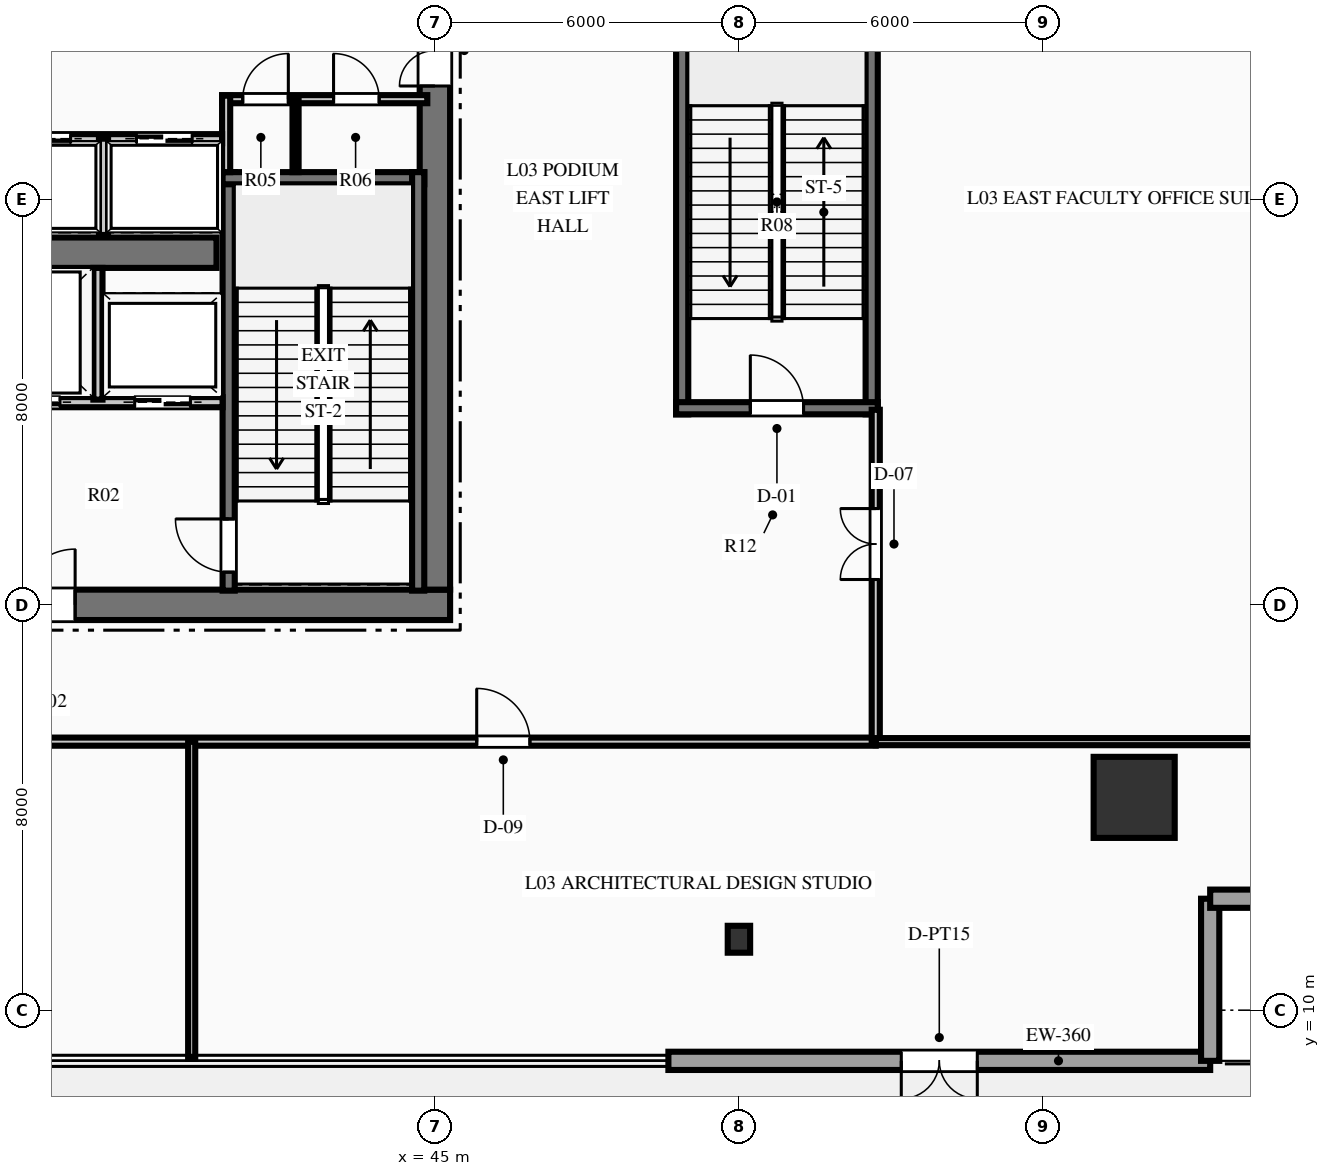
"""IFC4 building model, lengths in metres.
Left out: names, types, materials, properties, quantities, classifications, styles, units other than length and angle.
Written with IfcOpenShell. Run it as: python <this file> out.ifc"""

import sys

from ifc_helpers import new_model, si_unit, direction, frame, frame_2d, origin, origin_2d, place, context, subcontext, project, spatial, rectangle, hollow_rectangle, i_section, extrude, element, fill, save


model = new_model("IFC4")
c1 = context("Model", 3, precision=1e-05, world=origin(), true_north=direction((0.0, 1.0)))
c2 = subcontext(c1, "Body", "Model", "MODEL_VIEW")
j1 = project(units=[si_unit("LENGTHUNIT", "METRE"), si_unit("PLANEANGLEUNIT", "RADIAN")], contexts=[c1])
p1 = place(None, origin())
s1 = spatial("IfcSite", under=j1, at=p1, CompositionType="ELEMENT")
p2 = place(p1, origin())
s2 = spatial("IfcBuilding", under=s1, at=p2, CompositionType="ELEMENT")
p3 = place(p2, frame((0.0, 0.0, 16.8)))
s3 = spatial("IfcBuildingStorey", under=s2, at=p3, CompositionType="ELEMENT", Elevation=16.8)
p4 = place(p3, frame((26.7, 18.0, 0.0), z_axis=(0.0, 0.0, 1.0), x_axis=(1.0, 0.0, 0.0)))
e1 = element("IfcWall", 1, at=p4, inside=s3, PredefinedType="SHEAR", context=c2, shape_type="SweptSolid", body=[
    extrude(rectangle(XDim=18.6, YDim=0.6, at=frame_2d((9.3, 0.0))), origin(), (0.0, 0.0, 1.0), 5.4),
])
p5 = place(p4, frame((7.4, 0.0, 0.0)))
e2 = element("IfcOpeningElement", 2, at=p5, cuts=e1, PredefinedType="OPENING", context=c2, shape_type="SweptSolid", body=[
    extrude(rectangle(XDim=1.1, YDim=2.15, at=frame_2d((0.55, 1.075))), frame((0.0, 0.31, 0.0), z_axis=(0.0, -1.0, 0.0), x_axis=(1.0, 0.0, 0.0)), (0.0, 0.0, 1.0), 0.62),
])
p6 = place(p4, frame((10.1, 0.0, 0.0)))
e3 = element("IfcOpeningElement", 3, at=p6, cuts=e1, PredefinedType="OPENING", context=c2, shape_type="SweptSolid", body=[
    extrude(rectangle(XDim=1.1, YDim=2.15, at=frame_2d((0.55, 1.075))), frame((0.0, 0.31, 0.0), z_axis=(0.0, -1.0, 0.0), x_axis=(1.0, 0.0, 0.0)), (0.0, 0.0, 1.0), 0.62),
])
p7 = place(p3, frame((45.0, 18.3, 0.0), z_axis=(0.0, 0.0, 1.0), x_axis=(0.0, 1.0, 0.0)))
e4 = element("IfcWall", 4, at=p7, inside=s3, PredefinedType="SHEAR", context=c2, shape_type="SweptSolid", body=[
    extrude(rectangle(XDim=15.4, YDim=0.6, at=frame_2d((7.7, 0.0))), origin(), (0.0, 0.0, 1.0), 5.4),
])
p8 = place(p7, frame((9.94, 0.0, 0.0)))
e5 = element("IfcOpeningElement", 5, at=p8, cuts=e4, PredefinedType="OPENING", context=c2, shape_type="SweptSolid", body=[
    extrude(rectangle(XDim=1.4, YDim=2.2, at=frame_2d((0.7, 1.1))), frame((0.0, 0.31, 0.0), z_axis=(0.0, -1.0, 0.0), x_axis=(1.0, 0.0, 0.0)), (0.0, 0.0, 1.0), 0.62),
])
p9 = place(p3, frame((31.31, 24.95, 0.0), z_axis=(0.0, 0.0, 1.0), x_axis=(1.0, 0.0, 0.0)))
e6 = element("IfcWall", 6, at=p9, inside=s3, PredefinedType="SHEAR", context=c2, shape_type="SweptSolid", body=[
    extrude(rectangle(XDim=9.38, YDim=0.6, at=frame_2d((4.69, 0.0))), origin(), (0.0, 0.0, 1.0), 5.4),
])
p10 = place(p3, frame((40.93, 18.28, 0.0), z_axis=(0.0, 0.0, 1.0), x_axis=(0.0, 1.0, 0.0)))
e7 = element("IfcWall", 7, at=p10, inside=s3, PredefinedType="SHEAR", context=c2, shape_type="SweptSolid", body=[
    extrude(rectangle(XDim=8.26, YDim=0.24, at=frame_2d((4.13, 0.0))), origin(), (0.0, 0.0, 1.0), 5.4),
])
p11 = place(p10, frame((0.365, 0.0, 0.0)))
e8 = element("IfcOpeningElement", 8, at=p11, cuts=e7, PredefinedType="OPENING", context=c2, shape_type="SweptSolid", body=[
    extrude(rectangle(XDim=1.05, YDim=2.15, at=frame_2d((0.525, 1.075))), frame((0.0, 0.13, 0.0), z_axis=(0.0, -1.0, 0.0), x_axis=(1.0, 0.0, 0.0)), (0.0, 0.0, 1.0), 0.26),
])
p12 = place(p3, frame((40.81, 26.42, 0.0), z_axis=(0.0, 0.0, 1.0), x_axis=(1.0, 0.0, 0.0)))
e9 = element("IfcWall", 9, at=p12, inside=s3, PredefinedType="SHEAR", context=c2, shape_type="SweptSolid", body=[
    extrude(rectangle(XDim=3.98, YDim=0.24, at=frame_2d((1.99, 0.0))), origin(), (0.0, 0.0, 1.0), 5.4),
])
p13 = place(p3, frame((44.67, 18.28, 0.0), z_axis=(0.0, 0.0, 1.0), x_axis=(0.0, 1.0, 0.0)))
e10 = element("IfcWall", 10, at=p13, inside=s3, PredefinedType="SHEAR", context=c2, shape_type="SweptSolid", body=[
    extrude(rectangle(XDim=8.26, YDim=0.24, at=frame_2d((4.13, 0.0))), origin(), (0.0, 0.0, 1.0), 5.4),
])
for number, where, z_axis, x_axis in (
    (11, (49.88, 21.76, 0.0), (0.0, 0.0, 1.0), (0.0, 1.0, 0.0)),
    (12, (53.62, 21.76, 0.0), (0.0, 0.0, 1.0), (0.0, 1.0, 0.0)),
):
    element("IfcWall", number, at=place(p3, frame(where, z_axis=z_axis, x_axis=x_axis)), inside=s3, PredefinedType="SHEAR", context=c2, shape_type="SweptSolid", body=[
        extrude(rectangle(XDim=8.38, YDim=0.24, at=frame_2d((4.19, 0.0))), origin(), (0.0, 0.0, 1.0), 5.4),
    ])
p14 = place(p3, frame((49.76, 21.88, 0.0), z_axis=(0.0, 0.0, 1.0), x_axis=(1.0, 0.0, 0.0)))
e13 = element("IfcWall", 13, at=p14, inside=s3, PredefinedType="SHEAR", context=c2, shape_type="SweptSolid", body=[
    extrude(rectangle(XDim=3.98, YDim=0.24, at=frame_2d((1.99, 0.0))), origin(), (0.0, 0.0, 1.0), 5.4),
])
p15 = place(p14, frame((1.465, 0.0, 0.0)))
e14 = element("IfcOpeningElement", 14, at=p15, cuts=e13, PredefinedType="OPENING", context=c2, shape_type="SweptSolid", body=[
    extrude(rectangle(XDim=1.05, YDim=2.15, at=frame_2d((0.525, 1.075))), frame((0.0, 0.13, 0.0), z_axis=(0.0, -1.0, 0.0), x_axis=(1.0, 0.0, 0.0)), (0.0, 0.0, 1.0), 0.26),
])
p16 = place(p3, frame((58.8, 14.2, 0.0), z_axis=(0.0, 0.0, 1.0), x_axis=(1.0, 0.0, 0.0)))
e15 = element("IfcColumn", 15, at=p16, inside=s3, PredefinedType="COLUMN", context=c2, shape_type="SweptSolid", body=[
    extrude(hollow_rectangle(XDim=1.6, YDim=1.6, WallThickness=0.08, at=origin_2d()), origin(), (0.0, 0.0, 1.0), 5.4),
])
p17 = place(p3, frame((51.0, 11.4, 0.0), z_axis=(0.0, 0.0, 1.0), x_axis=(1.0, 0.0, 0.0)))
e16 = element("IfcColumn", 16, at=p17, inside=s3, PredefinedType="COLUMN", context=c2, shape_type="SweptSolid", body=[
    extrude(i_section(OverallWidth=0.442, OverallDepth=0.531, WebThickness=0.066, FlangeThickness=0.106, at=origin_2d()), origin(), (0.0, 0.0, 1.0), 5.4),
])
p18 = place(p3, frame((60.3, 9.0, 0.0), z_axis=(0.0, 0.0, 1.0), x_axis=(-1.0, 0.0, 0.0)))
e17 = element("IfcWall", 17, at=p18, inside=s3, PredefinedType="STANDARD", context=c2, shape_type="SweptSolid", body=[
    extrude(rectangle(XDim=10.692, YDim=0.36, at=frame_2d((5.346, 0.0))), origin(), (0.0, 0.0, 1.0), 4.98),
])
p19 = place(p18, frame((4.596, 0.0, 0.0)))
e18 = element("IfcOpeningElement", 18, at=p19, cuts=e17, PredefinedType="OPENING", context=c2, shape_type="SweptSolid", body=[
    extrude(rectangle(XDim=1.5, YDim=2.25, at=frame_2d((0.75, 1.125))), frame((0.0, 0.19, 0.0), z_axis=(0.0, -1.0, 0.0), x_axis=(1.0, 0.0, 0.0)), (0.0, 0.0, 1.0), 0.38),
])
for number, where, z_axis, x_axis in (
    (19, (60.3, 12.2, 0.0), (0.0, 0.0, 1.0), (0.0, -1.0, 0.0)),
    (20, (63.5, 12.2, 0.0), (0.0, 0.0, 1.0), (-1.0, 0.0, 0.0)),
):
    element("IfcWall", number, at=place(p3, frame(where, z_axis=z_axis, x_axis=x_axis)), inside=s3, PredefinedType="STANDARD", context=c2, shape_type="SweptSolid", body=[
        extrude(rectangle(XDim=3.2, YDim=0.36, at=frame_2d((1.6, 0.0))), origin(), (0.0, 0.0, 1.0), 4.98),
    ])
p20 = place(p3, frame((36.12, 22.0, 0.0), z_axis=(0.0, 0.0, 1.0), x_axis=(1.0, 0.0, 0.0)))
e21 = element("IfcWall", 21, at=p20, inside=s3, PredefinedType="PARTITIONING", context=c2, shape_type="SweptSolid", body=[
    extrude(rectangle(XDim=4.69, YDim=0.2, at=frame_2d((2.345, 0.0))), origin(), (0.0, 0.0, 1.0), 4.98),
])
p21 = place(p20, frame((2.955, 0.0, 0.0)))
e22 = element("IfcOpeningElement", 22, at=p21, cuts=e21, PredefinedType="OPENING", context=c2, shape_type="SweptSolid", body=[
    extrude(rectangle(XDim=1.1, YDim=2.15, at=frame_2d((0.55, 1.075))), frame((0.0, 0.11, 0.0), z_axis=(0.0, -1.0, 0.0), x_axis=(1.0, 0.0, 0.0)), (0.0, 0.0, 1.0), 0.22),
])
p22 = place(p20, frame((0.08, 0.0, 0.0)))
e23 = element("IfcOpeningElement", 23, at=p22, cuts=e21, PredefinedType="OPENING", context=c2, shape_type="SweptSolid", body=[
    extrude(rectangle(XDim=1.4, YDim=2.2, at=frame_2d((0.7, 1.1))), frame((0.0, 0.11, 0.0), z_axis=(0.0, -1.0, 0.0), x_axis=(1.0, 0.0, 0.0)), (0.0, 0.0, 1.0), 0.22),
])
p23 = place(p3, frame((38.35, 22.05, 0.0), z_axis=(0.0, 0.0, 1.0), x_axis=(0.0, 1.0, 0.0)))
e24 = element("IfcWall", 24, at=p23, inside=s3, PredefinedType="PARTITIONING", context=c2, shape_type="SweptSolid", body=[
    extrude(rectangle(XDim=2.6, YDim=0.18, at=frame_2d((1.3, 0.0))), origin(), (0.0, 0.0, 1.0), 4.98),
])
p24 = place(p3, frame((40.8, 27.98, 0.0), z_axis=(0.0, 0.0, 1.0), x_axis=(1.0, 0.0, 0.0)))
e25 = element("IfcWall", 25, at=p24, inside=s3, PredefinedType="PARTITIONING", context=c2, shape_type="SweptSolid", body=[
    extrude(rectangle(XDim=4.05, YDim=0.16, at=frame_2d((2.025, 0.0))), origin(), (0.0, 0.0, 1.0), 4.98),
])
p25 = place(p24, frame((0.407, 0.0, 0.0)))
e26 = element("IfcOpeningElement", 26, at=p25, cuts=e25, PredefinedType="OPENING", context=c2, shape_type="SweptSolid", body=[
    extrude(rectangle(XDim=0.9, YDim=2.15, at=frame_2d((0.45, 1.075))), frame((0.0, 0.09, 0.0), z_axis=(0.0, -1.0, 0.0), x_axis=(1.0, 0.0, 0.0)), (0.0, 0.0, 1.0), 0.18),
])
p26 = place(p24, frame((2.2, 0.0, 0.0)))
e27 = element("IfcOpeningElement", 27, at=p26, cuts=e25, PredefinedType="OPENING", context=c2, shape_type="SweptSolid", body=[
    extrude(rectangle(XDim=0.9, YDim=2.15, at=frame_2d((0.45, 1.075))), frame((0.0, 0.09, 0.0), z_axis=(0.0, -1.0, 0.0), x_axis=(1.0, 0.0, 0.0)), (0.0, 0.0, 1.0), 0.18),
])
p27 = place(p3, frame((40.88, 26.54, 0.0), z_axis=(0.0, 0.0, 1.0), x_axis=(0.0, 1.0, 0.0)))
e28 = element("IfcWall", 28, at=p27, inside=s3, PredefinedType="PARTITIONING", context=c2, shape_type="SweptSolid", body=[
    extrude(rectangle(XDim=1.51, YDim=0.16, at=frame_2d((0.755, 0.0))), origin(), (0.0, 0.0, 1.0), 4.98),
])
p28 = place(p3, frame((42.25, 26.54, 0.0), z_axis=(0.0, 0.0, 1.0), x_axis=(0.0, 1.0, 0.0)))
e29 = element("IfcWall", 29, at=p28, inside=s3, PredefinedType="PARTITIONING", context=c2, shape_type="SweptSolid", body=[
    extrude(rectangle(XDim=1.44, YDim=0.12, at=frame_2d((0.72, 0.0))), origin(), (0.0, 0.0, 1.0), 4.98),
])
p29 = place(p3, frame((31.2, 27.2, 0.0), z_axis=(0.0, 0.0, 1.0), x_axis=(1.0, 0.0, 0.0)))
e30 = element("IfcWall", 30, at=p29, inside=s3, PredefinedType="PARTITIONING", context=c2, shape_type="SweptSolid", body=[
    extrude(rectangle(XDim=9.6, YDim=0.18, at=frame_2d((4.8, 0.0))), origin(), (0.0, 0.0, 1.0), 4.98),
])
p30 = place(p29, frame((0.59, 0.0, 0.0)))
e31 = element("IfcOpeningElement", 31, at=p30, cuts=e30, PredefinedType="OPENING", context=c2, shape_type="SweptSolid", body=[
    extrude(rectangle(XDim=1.1, YDim=2.15, at=frame_2d((0.55, 1.075))), frame((0.0, 0.1, 0.0), z_axis=(0.0, -1.0, 0.0), x_axis=(1.0, 0.0, 0.0)), (0.0, 0.0, 1.0), 0.2),
])
p31 = place(p29, frame((2.99, 0.0, 0.0)))
e32 = element("IfcOpeningElement", 32, at=p31, cuts=e30, PredefinedType="OPENING", context=c2, shape_type="SweptSolid", body=[
    extrude(rectangle(XDim=1.1, YDim=2.15, at=frame_2d((0.55, 1.075))), frame((0.0, 0.1, 0.0), z_axis=(0.0, -1.0, 0.0), x_axis=(1.0, 0.0, 0.0)), (0.0, 0.0, 1.0), 0.2),
])
p32 = place(p29, frame((5.51, 0.0, 0.0)))
e33 = element("IfcOpeningElement", 33, at=p32, cuts=e30, PredefinedType="OPENING", context=c2, shape_type="SweptSolid", body=[
    extrude(rectangle(XDim=1.1, YDim=2.15, at=frame_2d((0.55, 1.075))), frame((0.0, 0.1, 0.0), z_axis=(0.0, -1.0, 0.0), x_axis=(1.0, 0.0, 0.0)), (0.0, 0.0, 1.0), 0.2),
])
p33 = place(p29, frame((7.91, 0.0, 0.0)))
e34 = element("IfcOpeningElement", 34, at=p33, cuts=e30, PredefinedType="OPENING", context=c2, shape_type="SweptSolid", body=[
    extrude(rectangle(XDim=1.1, YDim=2.15, at=frame_2d((0.55, 1.075))), frame((0.0, 0.1, 0.0), z_axis=(0.0, -1.0, 0.0), x_axis=(1.0, 0.0, 0.0)), (0.0, 0.0, 1.0), 0.2),
])
p34 = place(p3, frame((38.46, 25.3, 0.0), z_axis=(0.0, 0.0, 1.0), x_axis=(0.0, 1.0, 0.0)))
e35 = element("IfcWall", 35, at=p34, inside=s3, PredefinedType="PARTITIONING", context=c2, shape_type="SweptSolid", body=[
    extrude(rectangle(XDim=1.9, YDim=0.18, at=frame_2d((0.95, 0.0))), origin(), (0.0, 0.0, 1.0), 4.98),
])
p35 = place(p3, frame((18.3, 15.3, 0.0), z_axis=(0.0, 0.0, 1.0), x_axis=(1.0, 0.0, 0.0)))
e36 = element("IfcWall", 36, at=p35, inside=s3, PredefinedType="PARTITIONING", context=c2, shape_type="SweptSolid", body=[
    extrude(rectangle(XDim=35.4, YDim=0.16, at=frame_2d((17.7, 0.0))), origin(), (0.0, 0.0, 1.0), 4.202),
])
p36 = place(p35, frame((6.525, 0.0, 0.0)))
e37 = element("IfcOpeningElement", 37, at=p36, cuts=e36, PredefinedType="OPENING", context=c2, shape_type="SweptSolid", body=[
    extrude(rectangle(XDim=1.05, YDim=2.15, at=frame_2d((0.525, 1.075))), frame((0.0, 0.09, 0.0), z_axis=(0.0, -1.0, 0.0), x_axis=(1.0, 0.0, 0.0)), (0.0, 0.0, 1.0), 0.18),
])
p37 = place(p35, frame((16.7, 0.0, 0.0)))
e38 = element("IfcOpeningElement", 38, at=p37, cuts=e36, PredefinedType="OPENING", context=c2, shape_type="SweptSolid", body=[
    extrude(rectangle(XDim=1.4, YDim=2.2, at=frame_2d((0.7, 1.1))), frame((0.0, 0.09, 0.0), z_axis=(0.0, -1.0, 0.0), x_axis=(1.0, 0.0, 0.0)), (0.0, 0.0, 1.0), 0.18),
])
p38 = place(p35, frame((27.525, 0.0, 0.0)))
e39 = element("IfcOpeningElement", 39, at=p38, cuts=e36, PredefinedType="OPENING", context=c2, shape_type="SweptSolid", body=[
    extrude(rectangle(XDim=1.05, YDim=2.15, at=frame_2d((0.525, 1.075))), frame((0.0, 0.09, 0.0), z_axis=(0.0, -1.0, 0.0), x_axis=(1.0, 0.0, 0.0)), (0.0, 0.0, 1.0), 0.18),
])
p39 = place(p3, frame((53.7, 15.3, 0.0), z_axis=(0.0, 0.0, 1.0), x_axis=(0.0, 1.0, 0.0)))
e40 = element("IfcWall", 40, at=p39, inside=s3, PredefinedType="PARTITIONING", context=c2, shape_type="SweptSolid", body=[
    extrude(rectangle(XDim=6.55, YDim=0.16, at=frame_2d((3.275, 0.0))), origin(), (0.0, 0.0, 1.0), 4.98),
])
p40 = place(p39, frame((3.2, 0.0, 0.0)))
e41 = element("IfcOpeningElement", 41, at=p40, cuts=e40, PredefinedType="OPENING", context=c2, shape_type="SweptSolid", body=[
    extrude(rectangle(XDim=1.4, YDim=2.2, at=frame_2d((0.7, 1.1))), frame((0.0, 0.09, 0.0), z_axis=(0.0, -1.0, 0.0), x_axis=(1.0, 0.0, 0.0)), (0.0, 0.0, 1.0), 0.18),
])
p41 = place(p3, frame((53.7, 15.3, 0.0), z_axis=(0.0, 0.0, 1.0), x_axis=(1.0, 0.0, 0.0)))
e42 = element("IfcWall", 42, at=p41, inside=s3, PredefinedType="PARTITIONING", context=c2, shape_type="SweptSolid", body=[
    extrude(rectangle(XDim=9.76, YDim=0.14, at=frame_2d((4.88, 0.0))), origin(), (0.0, 0.0, 1.0), 4.202),
])
p42 = place(p3, frame((40.2, 9.04, 0.0), z_axis=(0.0, 0.0, 1.0), x_axis=(0.0, 1.0, 0.0)))
e43 = element("IfcWall", 43, at=p42, inside=s3, PredefinedType="PARTITIONING", context=c2, shape_type="SweptSolid", body=[
    extrude(rectangle(XDim=6.26, YDim=0.14, at=frame_2d((3.13, 0.0))), origin(), (0.0, 0.0, 1.0), 4.98),
])
p43 = place(p19, origin())
e44 = element("IfcDoor", 44, at=p43, inside=s3, OperationType="DOUBLE_DOOR_SINGLE_SWING", PredefinedType="DOOR", context=c2, shape_type="SweptSolid", body=[
    extrude(rectangle(XDim=1.5, YDim=2.25, at=frame_2d((0.75, 1.125))), frame((0.0, 0.025, 0.0), z_axis=(0.0, -1.0, 0.0), x_axis=(1.0, 0.0, 0.0)), (0.0, 0.0, 1.0), 0.05),
])
fill(e18, e44)
p44 = place(p25, origin())
e45 = element("IfcDoor", 45, at=p44, inside=s3, OperationType="SINGLE_SWING_RIGHT", PredefinedType="DOOR", context=c2, shape_type="SweptSolid", body=[
    extrude(rectangle(XDim=0.9, YDim=2.15, at=frame_2d((0.45, 1.075))), frame((0.0, 0.025, 0.0), z_axis=(0.0, -1.0, 0.0), x_axis=(1.0, 0.0, 0.0)), (0.0, 0.0, 1.0), 0.05),
])
fill(e26, e45)
p45 = place(p26, origin())
e46 = element("IfcDoor", 46, at=p45, inside=s3, OperationType="SINGLE_SWING_LEFT", PredefinedType="DOOR", context=c2, shape_type="SweptSolid", body=[
    extrude(rectangle(XDim=0.9, YDim=2.15, at=frame_2d((0.45, 1.075))), frame((0.0, 0.025, 0.0), z_axis=(0.0, -1.0, 0.0), x_axis=(1.0, 0.0, 0.0)), (0.0, 0.0, 1.0), 0.05),
])
fill(e27, e46)
p46 = place(p11, origin())
e47 = element("IfcDoor", 47, at=p46, inside=s3, OperationType="SINGLE_SWING_RIGHT", PredefinedType="DOOR", context=c2, shape_type="SweptSolid", body=[
    extrude(rectangle(XDim=1.05, YDim=2.15, at=frame_2d((0.525, 1.075))), frame((0.0, 0.025, 0.0), z_axis=(0.0, -1.0, 0.0), x_axis=(1.0, 0.0, 0.0)), (0.0, 0.0, 1.0), 0.05),
])
fill(e8, e47)
p47 = place(p6, origin())
e48 = element("IfcDoor", 48, at=p47, inside=s3, OperationType="SINGLE_SWING_RIGHT", PredefinedType="DOOR", context=c2, shape_type="SweptSolid", body=[
    extrude(rectangle(XDim=1.1, YDim=2.15, at=frame_2d((0.55, 1.075))), frame((0.0, 0.025, 0.0), z_axis=(0.0, -1.0, 0.0), x_axis=(1.0, 0.0, 0.0)), (0.0, 0.0, 1.0), 0.05),
])
fill(e3, e48)
p48 = place(p8, origin())
e49 = element("IfcDoor", 49, at=p48, inside=s3, OperationType="DOUBLE_DOOR_SINGLE_SWING", PredefinedType="DOOR", context=c2, shape_type="SweptSolid", body=[
    extrude(rectangle(XDim=1.4, YDim=2.2, at=frame_2d((0.7, 1.1))), frame((0.0, 0.025, 0.0), z_axis=(0.0, -1.0, 0.0), x_axis=(1.0, 0.0, 0.0)), (0.0, 0.0, 1.0), 0.05),
])
fill(e5, e49)
p49 = place(p15, origin())
e50 = element("IfcDoor", 50, at=p49, inside=s3, OperationType="SINGLE_SWING_LEFT", PredefinedType="DOOR", context=c2, shape_type="SweptSolid", body=[
    extrude(rectangle(XDim=1.05, YDim=2.15, at=frame_2d((0.525, 1.075))), frame((0.0, 0.025, 0.0), z_axis=(0.0, -1.0, 0.0), x_axis=(1.0, 0.0, 0.0)), (0.0, 0.0, 1.0), 0.05),
])
fill(e14, e50)
p50 = place(p38, origin())
e51 = element("IfcDoor", 51, at=p50, inside=s3, OperationType="SINGLE_SWING_LEFT", PredefinedType="DOOR", context=c2, shape_type="SweptSolid", body=[
    extrude(rectangle(XDim=1.05, YDim=2.15, at=frame_2d((0.525, 1.075))), frame((0.0, 0.025, 0.0), z_axis=(0.0, -1.0, 0.0), x_axis=(1.0, 0.0, 0.0)), (0.0, 0.0, 1.0), 0.05),
])
fill(e39, e51)
p51 = place(p40, origin())
e52 = element("IfcDoor", 52, at=p51, inside=s3, OperationType="DOUBLE_DOOR_SINGLE_SWING", PredefinedType="DOOR", context=c2, shape_type="SweptSolid", body=[
    extrude(rectangle(XDim=1.4, YDim=2.2, at=frame_2d((0.7, 1.1))), frame((0.0, 0.025, 0.0), z_axis=(0.0, -1.0, 0.0), x_axis=(1.0, 0.0, 0.0)), (0.0, 0.0, 1.0), 0.05),
])
fill(e41, e52)
p52 = place(p32, origin())
e53 = element("IfcDoor", 53, at=p52, inside=s3, OperationType="SLIDING_TO_LEFT", PredefinedType="DOOR", context=c2, shape_type="SweptSolid", body=[
    extrude(rectangle(XDim=1.1, YDim=2.15, at=frame_2d((0.55, 1.075))), frame((0.0, 0.025, 0.0), z_axis=(0.0, -1.0, 0.0), x_axis=(1.0, 0.0, 0.0)), (0.0, 0.0, 1.0), 0.05),
])
fill(e33, e53)
p53 = place(p33, origin())
e54 = element("IfcDoor", 54, at=p53, inside=s3, OperationType="SLIDING_TO_LEFT", PredefinedType="DOOR", context=c2, shape_type="SweptSolid", body=[
    extrude(rectangle(XDim=1.1, YDim=2.15, at=frame_2d((0.55, 1.075))), frame((0.0, 0.025, 0.0), z_axis=(0.0, -1.0, 0.0), x_axis=(1.0, 0.0, 0.0)), (0.0, 0.0, 1.0), 0.05),
])
fill(e34, e54)
p54 = place(p21, origin())
e55 = element("IfcDoor", 55, at=p54, inside=s3, OperationType="SLIDING_TO_LEFT", PredefinedType="DOOR", context=c2, shape_type="SweptSolid", body=[
    extrude(rectangle(XDim=1.1, YDim=2.15, at=frame_2d((0.55, 1.075))), frame((0.0, 0.025, 0.0), z_axis=(0.0, -1.0, 0.0), x_axis=(1.0, 0.0, 0.0)), (0.0, 0.0, 1.0), 0.05),
])
fill(e22, e55)
p55 = place(p22, origin())
e56 = element("IfcDoor", 56, at=p55, inside=s3, OperationType="SLIDING_TO_LEFT", PredefinedType="DOOR", context=c2, shape_type="SweptSolid", body=[
    extrude(rectangle(XDim=1.4, YDim=2.2, at=frame_2d((0.7, 1.1))), frame((0.0, 0.025, 0.0), z_axis=(0.0, -1.0, 0.0), x_axis=(1.0, 0.0, 0.0)), (0.0, 0.0, 1.0), 0.05),
])
fill(e23, e56)
save(model, sys.argv[1])
